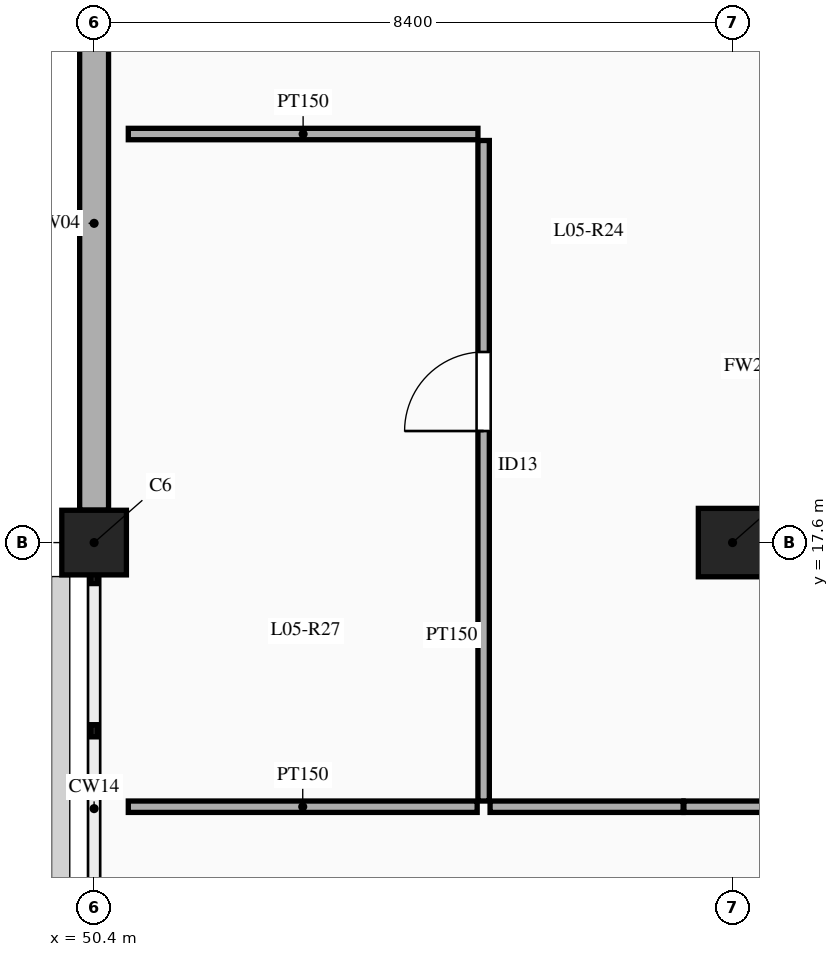
"""IFC4 building model, lengths in metres.
Left out: names, types, materials, properties, quantities, classifications, styles, units other than length and angle.
Written with IfcOpenShell. Run it as: python <this file> out.ifc"""

import sys

from ifc_helpers import new_model, si_unit, direction, frame, frame_2d, origin, origin_2d, place, context, subcontext, project, spatial, rectangle, extrude, element, fill, save


model = new_model("IFC4")
c1 = context("Model", 3, precision=1e-05, world=origin(), true_north=direction((0.0, 1.0)))
c2 = subcontext(c1, "Body", "Model", "MODEL_VIEW")
j1 = project(units=[si_unit("LENGTHUNIT", "METRE"), si_unit("PLANEANGLEUNIT", "RADIAN")], contexts=[c1])
p1 = place(None, origin())
s1 = spatial("IfcSite", under=j1, at=p1, CompositionType="ELEMENT")
p2 = place(p1, origin())
s2 = spatial("IfcBuilding", under=s1, at=p2, CompositionType="ELEMENT")
p3 = place(p2, frame((0.0, 0.0, 24.0)))
s3 = spatial("IfcBuildingStorey", under=s2, at=p3, CompositionType="ELEMENT", Elevation=24.0)
p4 = place(p3, frame((50.4, 17.6, 0.0), z_axis=(0.0, 0.0, 1.0), x_axis=(1.0, 0.0, 0.0)))
e1 = element("IfcColumn", 1, at=p4, inside=s3, PredefinedType="COLUMN", context=c2, shape_type="SweptSolid", body=[
    extrude(rectangle(XDim=0.85, YDim=0.85, at=origin_2d()), origin(), (0.0, 0.0, 1.0), 4.5),
])
p5 = place(p3, frame((58.8, 17.6, 0.0), z_axis=(0.0, 0.0, 1.0), x_axis=(1.0, 0.0, 0.0)))
e2 = element("IfcColumn", 2, at=p5, inside=s3, PredefinedType="COLUMN", context=c2, shape_type="SweptSolid", body=[
    extrude(rectangle(XDim=0.9, YDim=0.9, at=origin_2d()), origin(), (0.0, 0.0, 1.0), 4.5),
])
p6 = place(p3, frame((50.4, 18.027, 0.0), z_axis=(0.0, 0.0, 1.0), x_axis=(0.0, 1.0, 0.0)))
e3 = element("IfcWall", 3, at=p6, inside=s3, PredefinedType="SOLIDWALL", context=c2, shape_type="SweptSolid", body=[
    extrude(rectangle(XDim=7.546, YDim=0.38, at=frame_2d((3.773, 0.0))), origin(), (0.0, 0.0, 1.0), 3.55),
])
p7 = place(p3, frame((50.85, 22.975, 0.0), z_axis=(0.0, 0.0, 1.0), x_axis=(1.0, 0.0, 0.0)))
e4 = element("IfcWall", 4, at=p7, inside=s3, PredefinedType="PARTITIONING", context=c2, shape_type="SweptSolid", body=[
    extrude(rectangle(XDim=4.6, YDim=0.15, at=frame_2d((2.3, 0.0))), origin(), (0.0, 0.0, 1.0), 3.45),
])
p8 = place(p3, frame((55.525, 14.2, 0.0), z_axis=(0.0, 0.0, 1.0), x_axis=(0.0, 1.0, 0.0)))
e5 = element("IfcWall", 5, at=p8, inside=s3, PredefinedType="PARTITIONING", context=c2, shape_type="SweptSolid", body=[
    extrude(rectangle(XDim=8.69, YDim=0.15, at=frame_2d((4.345, 0.0))), origin(), (0.0, 0.0, 1.0), 3.45),
])
p9 = place(p8, frame((4.868, 0.0, 0.0)))
e6 = element("IfcOpeningElement", 6, at=p9, cuts=e5, PredefinedType="OPENING", context=c2, shape_type="SweptSolid", body=[
    extrude(rectangle(XDim=1.04, YDim=2.15, at=frame_2d((0.52, 1.075))), frame((0.0, 0.085, 0.0), z_axis=(0.0, -1.0, 0.0), x_axis=(1.0, 0.0, 0.0)), (0.0, 0.0, 1.0), 0.17),
])
p10 = place(p3, frame((55.61, 14.125, 0.0), z_axis=(0.0, 0.0, 1.0), x_axis=(1.0, 0.0, 0.0)))
e7 = element("IfcWall", 7, at=p10, inside=s3, PredefinedType="PARTITIONING", context=c2, shape_type="SweptSolid", body=[
    extrude(rectangle(XDim=2.54, YDim=0.15, at=frame_2d((1.27, 0.0))), origin(), (0.0, 0.0, 1.0), 3.45),
])
p11 = place(p3, frame((58.16, 14.125, 0.0), z_axis=(0.0, 0.0, 1.0), x_axis=(1.0, 0.0, 0.0)))
e8 = element("IfcWall", 8, at=p11, inside=s3, PredefinedType="PARTITIONING", context=c2, shape_type="SweptSolid", body=[
    extrude(rectangle(XDim=3.64, YDim=0.15, at=frame_2d((1.82, 0.0))), origin(), (0.0, 0.0, 1.0), 3.45),
])
p12 = place(p11, frame((1.3, 0.0, 0.0)))
e9 = element("IfcOpeningElement", 9, at=p12, cuts=e8, PredefinedType="OPENING", context=c2, shape_type="SweptSolid", body=[
    extrude(rectangle(XDim=1.04, YDim=2.15, at=frame_2d((0.52, 1.075))), frame((0.0, 0.085, 0.0), z_axis=(0.0, -1.0, 0.0), x_axis=(1.0, 0.0, 0.0)), (0.0, 0.0, 1.0), 0.17),
])
p13 = place(p3, frame((50.85, 14.125, 0.0), z_axis=(0.0, 0.0, 1.0), x_axis=(1.0, 0.0, 0.0)))
e10 = element("IfcWall", 10, at=p13, inside=s3, PredefinedType="PARTITIONING", context=c2, shape_type="SweptSolid", body=[
    extrude(rectangle(XDim=4.59, YDim=0.15, at=frame_2d((2.295, 0.0))), origin(), (0.0, 0.0, 1.0), 3.45),
])
p14 = place(p9, origin())
e11 = element("IfcDoor", 11, at=p14, inside=s3, OperationType="SINGLE_SWING_LEFT", PredefinedType="DOOR", context=c2, shape_type="SweptSolid", body=[
    extrude(rectangle(XDim=1.04, YDim=2.15, at=frame_2d((0.52, 1.075))), frame((0.0, 0.025, 0.0), z_axis=(0.0, -1.0, 0.0), x_axis=(1.0, 0.0, 0.0)), (0.0, 0.0, 1.0), 0.05),
])
fill(e6, e11)
save(model, sys.argv[1])
